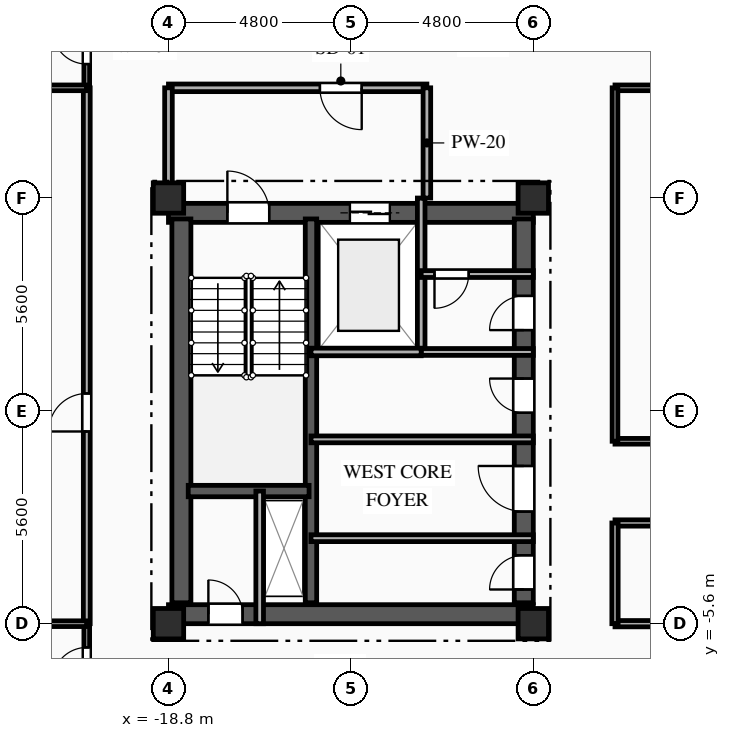
"""IFC4 building model, lengths in metres.
Left out: names, types, materials, properties, quantities, classifications, styles, units other than length and angle.
Written with IfcOpenShell. Run it as: python <this file> out.ifc"""

import sys

from ifc_helpers import new_model, si_unit, direction, frame, frame_2d, origin, origin_2d, place, context, subcontext, project, spatial, rectangle, extrude, element, fill, save


model = new_model("IFC4")
c1 = context("Model", 3, precision=1e-05, world=origin(), true_north=direction((0.0, 1.0)))
c2 = subcontext(c1, "Body", "Model", "MODEL_VIEW")
j1 = project(units=[si_unit("LENGTHUNIT", "METRE"), si_unit("PLANEANGLEUNIT", "RADIAN")], contexts=[c1])
p1 = place(None, origin())
s1 = spatial("IfcSite", under=j1, at=p1, CompositionType="ELEMENT")
p2 = place(p1, origin())
s2 = spatial("IfcBuilding", under=s1, at=p2, CompositionType="ELEMENT")
p3 = place(p2, frame((0.0, 0.0, 186.35)))
s3 = spatial("IfcBuildingStorey", under=s2, at=p3, CompositionType="ELEMENT", Elevation=186.35)
for number, where, z_axis, x_axis in (
    (1, (-18.8, -5.6, 0.0), (0.0, 0.0, 1.0), (1.0, 0.0, 0.0)),
    (2, (-18.8, 5.6, 0.0), (0.0, 0.0, 1.0), (1.0, 0.0, 0.0)),
    (3, (-9.2, -5.6, 0.0), (0.0, 0.0, 1.0), (1.0, 0.0, 0.0)),
    (4, (-9.2, 5.6, 0.0), (0.0, 0.0, 1.0), (1.0, 0.0, 0.0)),
):
    element("IfcColumn", number, at=place(p3, frame(where, z_axis=z_axis, x_axis=x_axis)), inside=s3, PredefinedType="COLUMN", context=c2, shape_type="SweptSolid", body=[
        extrude(rectangle(XDim=0.8, YDim=0.8, at=origin_2d()), origin(), (0.0, 0.0, 1.0), 3.35),
    ])
p4 = place(p3, frame((-18.8, 5.21, 0.0), z_axis=(0.0, 0.0, 1.0), x_axis=(1.0, 0.0, 0.0)))
e5 = element("IfcWall", 5, at=p4, inside=s3, PredefinedType="SHEAR", context=c2, shape_type="SweptSolid", body=[
    extrude(rectangle(XDim=9.6, YDim=0.5, at=frame_2d((4.8, 0.0))), origin(), (0.0, 0.0, 1.0), 3.04),
])
p5 = place(p4, frame((1.55, 0.0, 0.0)))
e6 = element("IfcOpeningElement", 6, at=p5, cuts=e5, PredefinedType="OPENING", context=c2, shape_type="SweptSolid", body=[
    extrude(rectangle(XDim=1.1, YDim=2.15, at=frame_2d((0.55, 1.075))), frame((0.0, 0.26, 0.0), z_axis=(0.0, -1.0, 0.0), x_axis=(1.0, 0.0, 0.0)), (0.0, 0.0, 1.0), 0.52),
])
p6 = place(p4, frame((4.775, 0.0, 0.0)))
e7 = element("IfcOpeningElement", 7, at=p6, cuts=e5, PredefinedType="OPENING", context=c2, shape_type="SweptSolid", body=[
    extrude(rectangle(XDim=1.05, YDim=2.1, at=frame_2d((0.525, 1.05))), frame((0.0, 0.26, 0.0), z_axis=(0.0, -1.0, 0.0), x_axis=(1.0, 0.0, 0.0)), (0.0, 0.0, 1.0), 0.52),
])
p7 = place(p3, frame((-18.8, -5.35, 0.0), z_axis=(0.0, 0.0, 1.0), x_axis=(1.0, 0.0, 0.0)))
e8 = element("IfcWall", 8, at=p7, inside=s3, PredefinedType="SHEAR", context=c2, shape_type="SweptSolid", body=[
    extrude(rectangle(XDim=9.6, YDim=0.5, at=frame_2d((4.8, 0.0))), origin(), (0.0, 0.0, 1.0), 3.04),
])
p8 = place(p7, frame((1.05, 0.0, 0.0)))
e9 = element("IfcOpeningElement", 9, at=p8, cuts=e8, PredefinedType="OPENING", context=c2, shape_type="SweptSolid", body=[
    extrude(rectangle(XDim=0.9, YDim=2.1, at=frame_2d((0.45, 1.05))), frame((0.0, 0.26, 0.0), z_axis=(0.0, -1.0, 0.0), x_axis=(1.0, 0.0, 0.0)), (0.0, 0.0, 1.0), 0.52),
])
p9 = place(p3, frame((-18.46, -5.05, 0.0), z_axis=(0.0, 0.0, 1.0), x_axis=(0.0, 1.0, 0.0)))
e10 = element("IfcWall", 10, at=p9, inside=s3, PredefinedType="SHEAR", context=c2, shape_type="SweptSolid", body=[
    extrude(rectangle(XDim=10.1, YDim=0.5, at=frame_2d((5.05, 0.0))), origin(), (0.0, 0.0, 1.0), 3.04),
])
p10 = place(p3, frame((-9.45, -5.05, 0.0), z_axis=(0.0, 0.0, 1.0), x_axis=(0.0, 1.0, 0.0)))
e11 = element("IfcWall", 11, at=p10, inside=s3, PredefinedType="SHEAR", context=c2, shape_type="SweptSolid", body=[
    extrude(rectangle(XDim=10.1, YDim=0.5, at=frame_2d((5.05, 0.0))), origin(), (0.0, 0.0, 1.0), 3.04),
])
p11 = place(p10, frame((7.175, 0.0, 0.0)))
e12 = element("IfcOpeningElement", 12, at=p11, cuts=e11, PredefinedType="OPENING", context=c2, shape_type="SweptSolid", body=[
    extrude(rectangle(XDim=0.9, YDim=2.1, at=frame_2d((0.45, 1.05))), frame((0.0, 0.26, 0.0), z_axis=(0.0, -1.0, 0.0), x_axis=(1.0, 0.0, 0.0)), (0.0, 0.0, 1.0), 0.52),
])
p12 = place(p10, frame((2.4, 0.0, 0.0)))
e13 = element("IfcOpeningElement", 13, at=p12, cuts=e11, PredefinedType="OPENING", context=c2, shape_type="SweptSolid", body=[
    extrude(rectangle(XDim=1.2, YDim=2.15, at=frame_2d((0.6, 1.075))), frame((0.0, 0.26, 0.0), z_axis=(0.0, -1.0, 0.0), x_axis=(1.0, 0.0, 0.0)), (0.0, 0.0, 1.0), 0.52),
])
p13 = place(p10, frame((0.35, 0.0, 0.0)))
e14 = element("IfcOpeningElement", 14, at=p13, cuts=e11, PredefinedType="OPENING", context=c2, shape_type="SweptSolid", body=[
    extrude(rectangle(XDim=0.9, YDim=2.1, at=frame_2d((0.45, 1.05))), frame((0.0, 0.26, 0.0), z_axis=(0.0, -1.0, 0.0), x_axis=(1.0, 0.0, 0.0)), (0.0, 0.0, 1.0), 0.52),
])
p14 = place(p10, frame((5.0, 0.0, 0.0)))
e15 = element("IfcOpeningElement", 15, at=p14, cuts=e11, PredefinedType="OPENING", context=c2, shape_type="SweptSolid", body=[
    extrude(rectangle(XDim=0.9, YDim=2.1, at=frame_2d((0.45, 1.05))), frame((0.0, 0.26, 0.0), z_axis=(0.0, -1.0, 0.0), x_axis=(1.0, 0.0, 0.0)), (0.0, 0.0, 1.0), 0.52),
])
p15 = place(p3, frame((-15.05, -5.05, 0.0), z_axis=(0.0, 0.0, 1.0), x_axis=(0.0, 1.0, 0.0)))
e16 = element("IfcWall", 16, at=p15, inside=s3, PredefinedType="SHEAR", context=c2, shape_type="SweptSolid", body=[
    extrude(rectangle(XDim=10.1, YDim=0.3, at=frame_2d((5.05, 0.0))), origin(), (0.0, 0.0, 1.0), 3.04),
])
p16 = place(p3, frame((-18.28, -2.11, 0.0), z_axis=(0.0, 0.0, 1.0), x_axis=(1.0, 0.0, 0.0)))
e17 = element("IfcWall", 17, at=p16, inside=s3, PredefinedType="SHEAR", context=c2, shape_type="SweptSolid", body=[
    extrude(rectangle(XDim=3.18, YDim=0.3, at=frame_2d((1.59, 0.0))), origin(), (0.0, 0.0, 1.0), 3.04),
])
p17 = place(p3, frame((-16.4, -5.6, 0.0), z_axis=(0.0, 0.0, 1.0), x_axis=(0.0, 1.0, 0.0)))
e18 = element("IfcWall", 18, at=p17, inside=s3, PredefinedType="PARTITIONING", context=c2, shape_type="SweptSolid", body=[
    extrude(rectangle(XDim=3.49, YDim=0.2, at=frame_2d((1.745, 0.0))), origin(), (0.0, 0.0, 1.0), 3.04),
])
p18 = place(p3, frame((-12.15, 1.55, 0.0), z_axis=(0.0, 0.0, 1.0), x_axis=(0.0, 1.0, 0.0)))
e19 = element("IfcWall", 19, at=p18, inside=s3, PredefinedType="PARTITIONING", context=c2, shape_type="SweptSolid", body=[
    extrude(rectangle(XDim=2.05, YDim=0.2, at=frame_2d((1.025, 0.0))), origin(), (0.0, 0.0, 1.0), 3.04),
])
p19 = place(p3, frame((-12.15, 3.6, 0.0), z_axis=(0.0, 0.0, 1.0), x_axis=(0.0, 1.0, 0.0)))
e20 = element("IfcWall", 20, at=p19, inside=s3, PredefinedType="PARTITIONING", context=c2, shape_type="SweptSolid", body=[
    extrude(rectangle(XDim=2.0, YDim=0.2, at=frame_2d((1.0, 0.0))), origin(), (0.0, 0.0, 1.0), 3.04),
])
p20 = place(p3, frame((-12.0, 8.5, 0.0), z_axis=(0.0, 0.0, 1.0), x_axis=(-1.0, 0.0, 0.0)))
e21 = element("IfcWall", 21, at=p20, inside=s3, PredefinedType="PARTITIONING", context=c2, shape_type="SweptSolid", body=[
    extrude(rectangle(XDim=6.8, YDim=0.2, at=frame_2d((3.4, 0.0))), origin(), (0.0, 0.0, 1.0), 3.04),
])
p21 = place(p20, frame((1.715, 0.0, 0.0)))
e22 = element("IfcOpeningElement", 22, at=p21, cuts=e21, PredefinedType="OPENING", context=c2, shape_type="SweptSolid", body=[
    extrude(rectangle(XDim=1.1, YDim=2.15, at=frame_2d((0.55, 1.075))), frame((0.0, 0.11, 0.0), z_axis=(0.0, -1.0, 0.0), x_axis=(1.0, 0.0, 0.0)), (0.0, 0.0, 1.0), 0.22),
])
p22 = place(p3, frame((-18.8, 8.5, 0.0), z_axis=(0.0, 0.0, 1.0), x_axis=(0.0, -1.0, 0.0)))
e23 = element("IfcWall", 23, at=p22, inside=s3, PredefinedType="PARTITIONING", context=c2, shape_type="SweptSolid", body=[
    extrude(rectangle(XDim=2.9, YDim=0.2, at=frame_2d((1.45, 0.0))), origin(), (0.0, 0.0, 1.0), 2.665),
])
p23 = place(p3, frame((-12.0, 5.6, 0.0), z_axis=(0.0, 0.0, 1.0), x_axis=(0.0, 1.0, 0.0)))
e24 = element("IfcWall", 24, at=p23, inside=s3, PredefinedType="PARTITIONING", context=c2, shape_type="SweptSolid", body=[
    extrude(rectangle(XDim=2.9, YDim=0.2, at=frame_2d((1.45, 0.0))), origin(), (0.0, 0.0, 1.0), 3.04),
])
p24 = place(p3, frame((-9.2, 3.6, 0.0), z_axis=(0.0, 0.0, 1.0), x_axis=(-1.0, 0.0, 0.0)))
e25 = element("IfcWall", 25, at=p24, inside=s3, PredefinedType="PARTITIONING", context=c2, shape_type="SweptSolid", body=[
    extrude(rectangle(XDim=2.95, YDim=0.18, at=frame_2d((1.475, 0.0))), origin(), (0.0, 0.0, 1.0), 3.04),
])
p25 = place(p24, frame((1.7, 0.0, 0.0)))
e26 = element("IfcOpeningElement", 26, at=p25, cuts=e25, PredefinedType="OPENING", context=c2, shape_type="SweptSolid", body=[
    extrude(rectangle(XDim=0.9, YDim=2.1, at=frame_2d((0.45, 1.05))), frame((0.0, 0.1, 0.0), z_axis=(0.0, -1.0, 0.0), x_axis=(1.0, 0.0, 0.0)), (0.0, 0.0, 1.0), 0.2),
])
p26 = place(p3, frame((-12.15, 1.55, 0.0), z_axis=(0.0, 0.0, 1.0), x_axis=(1.0, 0.0, 0.0)))
e27 = element("IfcWall", 27, at=p26, inside=s3, PredefinedType="PARTITIONING", context=c2, shape_type="SweptSolid", body=[
    extrude(rectangle(XDim=2.95, YDim=0.18, at=frame_2d((1.475, 0.0))), origin(), (0.0, 0.0, 1.0), 3.04),
])
p27 = place(p3, frame((-15.05, -3.35, 0.0), z_axis=(0.0, 0.0, 1.0), x_axis=(1.0, 0.0, 0.0)))
e28 = element("IfcWall", 28, at=p27, inside=s3, PredefinedType="PARTITIONING", context=c2, shape_type="SweptSolid", body=[
    extrude(rectangle(XDim=5.85, YDim=0.18, at=frame_2d((2.925, 0.0))), origin(), (0.0, 0.0, 1.0), 2.755),
])
p28 = place(p3, frame((-9.2, -0.75, 0.0), z_axis=(0.0, 0.0, 1.0), x_axis=(-1.0, 0.0, 0.0)))
e29 = element("IfcWall", 29, at=p28, inside=s3, PredefinedType="PARTITIONING", context=c2, shape_type="SweptSolid", body=[
    extrude(rectangle(XDim=5.85, YDim=0.18, at=frame_2d((2.925, 0.0))), origin(), (0.0, 0.0, 1.0), 3.04),
])
p29 = place(p3, frame((-20.95, 8.5, 0.0), z_axis=(0.0, 0.0, 1.0), x_axis=(0.0, 1.0, 0.0)))
e30 = element("IfcWall", 30, at=p29, inside=s3, PredefinedType="PARTITIONING", context=c2, shape_type="SweptSolid", body=[
    extrude(rectangle(XDim=2.15, YDim=0.15, at=frame_2d((1.075, 0.0))), origin(), (0.0, 0.0, 1.0), 3.04),
])
p30 = place(p29, frame((0.625, 0.0, 0.0)))
e31 = element("IfcOpeningElement", 31, at=p30, cuts=e30, PredefinedType="OPENING", context=c2, shape_type="SweptSolid", body=[
    extrude(rectangle(XDim=0.9, YDim=2.1, at=frame_2d((0.45, 1.05))), frame((0.0, 0.085, 0.0), z_axis=(0.0, -1.0, 0.0), x_axis=(1.0, 0.0, 0.0)), (0.0, 0.0, 1.0), 0.17),
])
p31 = place(p3, frame((0.0, 8.5, 0.0), z_axis=(0.0, 0.0, 1.0), x_axis=(-1.0, 0.0, 0.0)))
e32 = element("IfcWall", 32, at=p31, inside=s3, PredefinedType="PARTITIONING", context=c2, shape_type="SweptSolid", body=[
    extrude(rectangle(XDim=7.05, YDim=0.15, at=frame_2d((3.525, 0.0))), origin(), (0.0, 0.0, 1.0), 3.04),
])
p32 = place(p3, frame((-20.95, -7.75, 0.0), z_axis=(0.0, 0.0, 1.0), x_axis=(0.0, 1.0, 0.0)))
e33 = element("IfcWall", 33, at=p32, inside=s3, PredefinedType="PARTITIONING", context=c2, shape_type="SweptSolid", body=[
    extrude(rectangle(XDim=2.15, YDim=0.15, at=frame_2d((1.075, 0.0))), origin(), (0.0, 0.0, 1.0), 3.04),
])
p33 = place(p32, frame((0.625, 0.0, 0.0)))
e34 = element("IfcOpeningElement", 34, at=p33, cuts=e33, PredefinedType="OPENING", context=c2, shape_type="SweptSolid", body=[
    extrude(rectangle(XDim=0.9, YDim=2.1, at=frame_2d((0.45, 1.05))), frame((0.0, 0.085, 0.0), z_axis=(0.0, -1.0, 0.0), x_axis=(1.0, 0.0, 0.0)), (0.0, 0.0, 1.0), 0.17),
])
p34 = place(p3, frame((-7.05, -5.6, 0.0), z_axis=(0.0, 0.0, 1.0), x_axis=(1.0, 0.0, 0.0)))
e35 = element("IfcWall", 35, at=p34, inside=s3, PredefinedType="PARTITIONING", context=c2, shape_type="SweptSolid", body=[
    extrude(rectangle(XDim=7.05, YDim=0.165, at=frame_2d((3.525, 0.0))), origin(), (0.0, 0.0, 1.0), 2.525),
])
p35 = place(p34, frame((4.728, 0.0, 0.0)))
e36 = element("IfcOpeningElement", 36, at=p35, cuts=e35, PredefinedType="OPENING", context=c2, shape_type="SweptSolid", body=[
    extrude(rectangle(XDim=1.15, YDim=2.15, at=frame_2d((0.575, 1.075))), frame((0.0, 0.093, 0.0), z_axis=(0.0, -1.0, 0.0), x_axis=(1.0, 0.0, 0.0)), (0.0, 0.0, 1.0), 0.185),
])
p36 = place(p3, frame((-20.95, -5.6, 0.0), z_axis=(0.0, 0.0, 1.0), x_axis=(0.0, 1.0, 0.0)))
e37 = element("IfcWall", 37, at=p36, inside=s3, PredefinedType="PARTITIONING", context=c2, shape_type="SweptSolid", body=[
    extrude(rectangle(XDim=14.1, YDim=0.18, at=frame_2d((7.05, 0.0))), origin(), (0.0, 0.0, 1.0), 3.04),
])
p37 = place(p36, frame((5.058, 0.0, 0.0)))
e38 = element("IfcOpeningElement", 38, at=p37, cuts=e37, PredefinedType="OPENING", context=c2, shape_type="SweptSolid", body=[
    extrude(rectangle(XDim=1.0, YDim=2.15, at=frame_2d((0.5, 1.075))), frame((0.0, 0.1, 0.0), z_axis=(0.0, -1.0, 0.0), x_axis=(1.0, 0.0, 0.0)), (0.0, 0.0, 1.0), 0.2),
])
p38 = place(p3, frame((-7.05, -0.8, 0.0), z_axis=(0.0, 0.0, 1.0), x_axis=(1.0, 0.0, 0.0)))
e39 = element("IfcWall", 39, at=p38, inside=s3, PredefinedType="PARTITIONING", context=c2, shape_type="SweptSolid", body=[
    extrude(rectangle(XDim=14.1, YDim=0.15, at=frame_2d((7.05, 0.0))), origin(), (0.0, 0.0, 1.0), 3.04),
])
p39 = place(p38, frame((6.525, 0.0, 0.0)))
e40 = element("IfcOpeningElement", 40, at=p39, cuts=e39, PredefinedType="OPENING", context=c2, shape_type="SweptSolid", body=[
    extrude(rectangle(XDim=1.05, YDim=2.15, at=frame_2d((0.525, 1.075))), frame((0.0, 0.085, 0.0), z_axis=(0.0, -1.0, 0.0), x_axis=(1.0, 0.0, 0.0)), (0.0, 0.0, 1.0), 0.17),
])
p40 = place(p3, frame((0.0, -2.95, 0.0), z_axis=(0.0, 0.0, 1.0), x_axis=(-1.0, 0.0, 0.0)))
e41 = element("IfcWall", 41, at=p40, inside=s3, PredefinedType="PARTITIONING", context=c2, shape_type="SweptSolid", body=[
    extrude(rectangle(XDim=7.05, YDim=0.165, at=frame_2d((3.525, 0.0))), origin(), (0.0, 0.0, 1.0), 3.04),
])
p41 = place(p3, frame((-7.05, 8.5, 0.0), z_axis=(0.0, 0.0, 1.0), x_axis=(0.0, -1.0, 0.0)))
e42 = element("IfcWall", 42, at=p41, inside=s3, PredefinedType="PARTITIONING", context=c2, shape_type="SweptSolid", body=[
    extrude(rectangle(XDim=9.3, YDim=0.15, at=frame_2d((4.65, 0.0))), origin(), (0.0, 0.0, 1.0), 3.04),
])
p42 = place(p3, frame((-7.05, -2.95, 0.0), z_axis=(0.0, 0.0, 1.0), x_axis=(0.0, -1.0, 0.0)))
e43 = element("IfcWall", 43, at=p42, inside=s3, PredefinedType="PARTITIONING", context=c2, shape_type="SweptSolid", body=[
    extrude(rectangle(XDim=2.65, YDim=0.165, at=frame_2d((1.325, 0.0))), origin(), (0.0, 0.0, 1.0), 3.04),
])
p43 = place(p3, frame((-23.6, 8.5, 0.0), z_axis=(0.0, 0.0, 1.0), x_axis=(1.0, 0.0, 0.0)))
e44 = element("IfcWall", 44, at=p43, inside=s3, PredefinedType="PARTITIONING", context=c2, shape_type="SweptSolid", body=[
    extrude(rectangle(XDim=2.65, YDim=0.15, at=frame_2d((1.325, 0.0))), origin(), (0.0, 0.0, 1.0), 3.04),
])
p44 = place(p43, frame((0.635, 0.0, 0.0)))
e45 = element("IfcOpeningElement", 45, at=p44, cuts=e44, PredefinedType="OPENING", context=c2, shape_type="SweptSolid", body=[
    extrude(rectangle(XDim=1.05, YDim=2.15, at=frame_2d((0.525, 1.075))), frame((0.0, 0.085, 0.0), z_axis=(0.0, -1.0, 0.0), x_axis=(1.0, 0.0, 0.0)), (0.0, 0.0, 1.0), 0.17),
])
p45 = place(p3, frame((-20.95, -5.6, 0.0), z_axis=(0.0, 0.0, 1.0), x_axis=(-1.0, 0.0, 0.0)))
e46 = element("IfcWall", 46, at=p45, inside=s3, PredefinedType="PARTITIONING", context=c2, shape_type="SweptSolid", body=[
    extrude(rectangle(XDim=2.65, YDim=0.15, at=frame_2d((1.325, 0.0))), origin(), (0.0, 0.0, 1.0), 3.04),
])
p46 = place(p45, frame((0.965, 0.0, 0.0)))
e47 = element("IfcOpeningElement", 47, at=p46, cuts=e46, PredefinedType="OPENING", context=c2, shape_type="SweptSolid", body=[
    extrude(rectangle(XDim=1.05, YDim=2.15, at=frame_2d((0.525, 1.075))), frame((0.0, 0.085, 0.0), z_axis=(0.0, -1.0, 0.0), x_axis=(1.0, 0.0, 0.0)), (0.0, 0.0, 1.0), 0.17),
])
p47 = place(p3, frame((-15.05, 1.55, 0.0), z_axis=(0.0, 0.0, 1.0), x_axis=(1.0, 0.0, 0.0)))
e48 = element("IfcWall", 48, at=p47, inside=s3, PredefinedType="PARTITIONING", context=c2, shape_type="SweptSolid", body=[
    extrude(rectangle(XDim=2.9, YDim=0.2, at=frame_2d((1.45, 0.0))), origin(), (0.0, 0.0, 1.0), 3.04),
])
p48 = place(p5, origin())
e49 = element("IfcDoor", 49, at=p48, inside=s3, OperationType="SINGLE_SWING_LEFT", PredefinedType="DOOR", context=c2, shape_type="SweptSolid", body=[
    extrude(rectangle(XDim=1.1, YDim=2.15, at=frame_2d((0.55, 1.075))), frame((0.0, 0.025, 0.0), z_axis=(0.0, -1.0, 0.0), x_axis=(1.0, 0.0, 0.0)), (0.0, 0.0, 1.0), 0.05),
])
fill(e6, e49)
p49 = place(p6, origin())
e50 = element("IfcDoor", 50, at=p49, inside=s3, OperationType="DOUBLE_DOOR_SLIDING", PredefinedType="DOOR", context=c2, shape_type="SweptSolid", body=[
    extrude(rectangle(XDim=1.05, YDim=2.1, at=frame_2d((0.525, 1.05))), frame((0.0, 0.025, 0.0), z_axis=(0.0, -1.0, 0.0), x_axis=(1.0, 0.0, 0.0)), (0.0, 0.0, 1.0), 0.05),
])
fill(e7, e50)
p50 = place(p8, origin())
e51 = element("IfcDoor", 51, at=p50, inside=s3, OperationType="SINGLE_SWING_LEFT", PredefinedType="DOOR", context=c2, shape_type="SweptSolid", body=[
    extrude(rectangle(XDim=0.9, YDim=2.1, at=frame_2d((0.45, 1.05))), frame((0.0, 0.025, 0.0), z_axis=(0.0, -1.0, 0.0), x_axis=(1.0, 0.0, 0.0)), (0.0, 0.0, 1.0), 0.05),
])
fill(e9, e51)
p51 = place(p21, origin())
e52 = element("IfcDoor", 52, at=p51, inside=s3, OperationType="SINGLE_SWING_LEFT", PredefinedType="DOOR", context=c2, shape_type="SweptSolid", body=[
    extrude(rectangle(XDim=1.1, YDim=2.15, at=frame_2d((0.55, 1.075))), frame((0.0, 0.025, 0.0), z_axis=(0.0, -1.0, 0.0), x_axis=(1.0, 0.0, 0.0)), (0.0, 0.0, 1.0), 0.05),
])
fill(e22, e52)
p52 = place(p25, origin())
e53 = element("IfcDoor", 53, at=p52, inside=s3, OperationType="SINGLE_SWING_RIGHT", PredefinedType="DOOR", context=c2, shape_type="SweptSolid", body=[
    extrude(rectangle(XDim=0.9, YDim=2.1, at=frame_2d((0.45, 1.05))), frame((0.0, 0.025, 0.0), z_axis=(0.0, -1.0, 0.0), x_axis=(1.0, 0.0, 0.0)), (0.0, 0.0, 1.0), 0.05),
])
fill(e26, e53)
p53 = place(p11, origin())
e54 = element("IfcDoor", 54, at=p53, inside=s3, OperationType="SINGLE_SWING_LEFT", PredefinedType="DOOR", context=c2, shape_type="SweptSolid", body=[
    extrude(rectangle(XDim=0.9, YDim=2.1, at=frame_2d((0.45, 1.05))), frame((0.0, 0.025, 0.0), z_axis=(0.0, -1.0, 0.0), x_axis=(1.0, 0.0, 0.0)), (0.0, 0.0, 1.0), 0.05),
])
fill(e12, e54)
p54 = place(p12, origin())
e55 = element("IfcDoor", 55, at=p54, inside=s3, OperationType="SINGLE_SWING_RIGHT", PredefinedType="DOOR", context=c2, shape_type="SweptSolid", body=[
    extrude(rectangle(XDim=1.2, YDim=2.15, at=frame_2d((0.6, 1.075))), frame((0.0, 0.025, 0.0), z_axis=(0.0, -1.0, 0.0), x_axis=(1.0, 0.0, 0.0)), (0.0, 0.0, 1.0), 0.05),
])
fill(e13, e55)
p55 = place(p13, origin())
e56 = element("IfcDoor", 56, at=p55, inside=s3, OperationType="SINGLE_SWING_LEFT", PredefinedType="DOOR", context=c2, shape_type="SweptSolid", body=[
    extrude(rectangle(XDim=0.9, YDim=2.1, at=frame_2d((0.45, 1.05))), frame((0.0, 0.025, 0.0), z_axis=(0.0, -1.0, 0.0), x_axis=(1.0, 0.0, 0.0)), (0.0, 0.0, 1.0), 0.05),
])
fill(e14, e56)
p56 = place(p14, origin())
e57 = element("IfcDoor", 57, at=p56, inside=s3, OperationType="SINGLE_SWING_RIGHT", PredefinedType="DOOR", context=c2, shape_type="SweptSolid", body=[
    extrude(rectangle(XDim=0.9, YDim=2.1, at=frame_2d((0.45, 1.05))), frame((0.0, 0.025, 0.0), z_axis=(0.0, -1.0, 0.0), x_axis=(1.0, 0.0, 0.0)), (0.0, 0.0, 1.0), 0.05),
])
fill(e15, e57)
p57 = place(p30, origin())
e58 = element("IfcDoor", 58, at=p57, inside=s3, OperationType="SINGLE_SWING_RIGHT", PredefinedType="DOOR", context=c2, shape_type="SweptSolid", body=[
    extrude(rectangle(XDim=0.9, YDim=2.1, at=frame_2d((0.45, 1.05))), frame((0.0, 0.025, 0.0), z_axis=(0.0, -1.0, 0.0), x_axis=(1.0, 0.0, 0.0)), (0.0, 0.0, 1.0), 0.05),
])
fill(e31, e58)
p58 = place(p33, origin())
e59 = element("IfcDoor", 59, at=p58, inside=s3, OperationType="SINGLE_SWING_LEFT", PredefinedType="DOOR", context=c2, shape_type="SweptSolid", body=[
    extrude(rectangle(XDim=0.9, YDim=2.1, at=frame_2d((0.45, 1.05))), frame((0.0, 0.025, 0.0), z_axis=(0.0, -1.0, 0.0), x_axis=(1.0, 0.0, 0.0)), (0.0, 0.0, 1.0), 0.05),
])
fill(e34, e59)
p59 = place(p37, origin())
e60 = element("IfcDoor", 60, at=p59, inside=s3, OperationType="SINGLE_SWING_LEFT", PredefinedType="DOOR", context=c2, shape_type="SweptSolid", body=[
    extrude(rectangle(XDim=1.0, YDim=2.15, at=frame_2d((0.5, 1.075))), frame((0.0, 0.025, 0.0), z_axis=(0.0, -1.0, 0.0), x_axis=(1.0, 0.0, 0.0)), (0.0, 0.0, 1.0), 0.05),
])
fill(e38, e60)
save(model, sys.argv[1])
